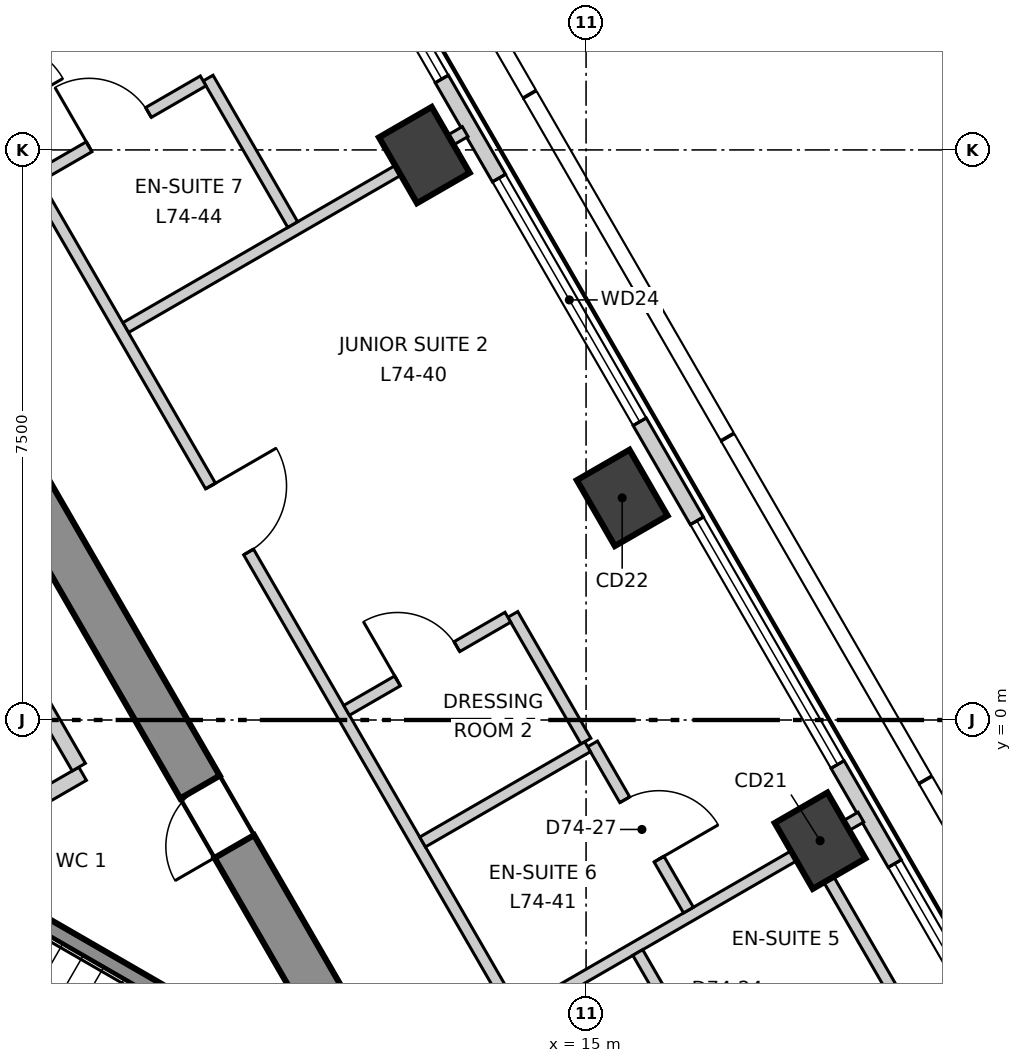
"""IFC4 building model, lengths in metres.
Left out: names, types, materials, properties, quantities, classifications, styles, units other than length and angle.
Written with IfcOpenShell. Run it as: python <this file> out.ifc"""

import sys

from ifc_helpers import new_model, si_unit, direction, frame, frame_2d, origin, origin_2d, place, context, subcontext, project, spatial, polyline, rectangle, outline, extrude, element, fill, save


model = new_model("IFC4")
c1 = context("Model", 3, precision=1e-05, world=origin(), true_north=direction((0.0, 1.0)))
c2 = subcontext(c1, "Body", "Model", "MODEL_VIEW")
j1 = project(units=[si_unit("LENGTHUNIT", "METRE"), si_unit("PLANEANGLEUNIT", "RADIAN")], contexts=[c1])
p1 = place(None, origin())
s1 = spatial("IfcSite", under=j1, at=p1, CompositionType="ELEMENT")
p2 = place(p1, origin())
s2 = spatial("IfcBuilding", under=s1, at=p2, CompositionType="ELEMENT")
p3 = place(p2, frame((0.0, 0.0, 311.5)))
s3 = spatial("IfcBuildingStorey", under=s2, at=p3, CompositionType="ELEMENT", Elevation=311.5)
p4 = place(p3, frame((12.384, -5.15, -0.3), z_axis=(0.0, 0.0, 1.0), x_axis=(-0.500000539815, 0.866025092122, 0.0)))
e1 = element("IfcWall", 1, at=p4, inside=s3, PredefinedType="SHEAR", context=c2, shape_type="SweptSolid", body=[
    extrude(outline(polyline([(-0.173, -0.301), (1.795, -0.301), (3.763, -0.301), (5.731, -0.301), (7.7, -0.301), (9.668, -0.301), (11.636, -0.301), (13.604, -0.3), (15.573, -0.3), (17.541, -0.3), (19.509, -0.3), (21.477, -0.3), (21.131, 0.3), (19.226, 0.3), (17.321, 0.3), (15.415, 0.3), (13.51, 0.3), (11.605, 0.3), (9.699, 0.3), (7.794, 0.3), (5.889, 0.3), (3.984, 0.3), (2.078, 0.3), (0.173, 0.3), (-0.173, -0.301)])), origin(), (0.0, 0.0, 1.0), 3.6),
])
p5 = place(p4, frame((16.378, 0.0, 0.3)))
e2 = element("IfcOpeningElement", 2, at=p5, cuts=e1, PredefinedType="OPENING", context=c2, shape_type="SweptSolid", body=[
    extrude(rectangle(XDim=0.9, YDim=2.1, at=frame_2d((0.45, 1.05))), frame((0.0, 0.31, 0.0), z_axis=(0.0, -1.0, 0.0), x_axis=(1.0, 0.0, 0.0)), (0.0, 0.0, 1.0), 0.621),
])
p6 = place(p4, frame((4.026, 0.0, 0.3)))
e3 = element("IfcOpeningElement", 3, at=p6, cuts=e1, PredefinedType="OPENING", context=c2, shape_type="SweptSolid", body=[
    extrude(rectangle(XDim=0.9, YDim=2.1, at=frame_2d((0.45, 1.05))), frame((0.0, 0.31, 0.0), z_axis=(0.0, -1.0, 0.0), x_axis=(1.0, 0.0, 0.0)), (0.0, 0.0, 1.0), 0.621),
])
for number, where, z_axis, x_axis in (
    (4, (18.079, -1.588, -0.3), (0.0, 0.0, 1.0), (-0.5, 0.866, 0.0)),
    (5, (15.475, 2.922, -0.3), (0.0, 0.0, 1.0), (-0.5, 0.866, 0.0)),
    (6, (12.872, 7.432, -0.3), (0.0, 0.0, 1.0), (-0.5, 0.866, 0.0)),
):
    element("IfcColumn", number, at=place(p3, frame(where, z_axis=z_axis, x_axis=x_axis)), inside=s3, PredefinedType="COLUMN", context=c2, shape_type="SweptSolid", body=[
        extrude(rectangle(XDim=1.0, YDim=0.8, at=origin_2d()), origin(), (0.0, 0.0, 1.0), 3.6),
    ])
p7 = place(p3, frame((24.544, -11.385, 0.0), z_axis=(0.0, 0.0, 1.0), x_axis=(-0.500002044679, 0.866024223285, 0.0)))
e7 = element("IfcWall", 7, at=p7, inside=s3, PredefinedType="ELEMENTEDWALL", context=c2, shape_type="SweptSolid", body=[
    extrude(rectangle(XDim=44.243, YDim=0.2, at=frame_2d((22.122, 0.0))), origin(), (0.0, 0.0, 1.0), 3.3),
])
p8 = place(p7, frame((2.056, 0.0, 0.9)))
e8 = element("IfcOpeningElement", 8, at=p8, cuts=e7, PredefinedType="OPENING", context=c2, shape_type="SweptSolid", body=[
    extrude(rectangle(XDim=3.7, YDim=2.2, at=frame_2d((1.85, 1.1))), frame((0.0, 0.11, 0.0), z_axis=(0.0, -1.0, 0.0), x_axis=(1.0, 0.0, 0.0)), (0.0, 0.0, 1.0), 0.22),
])
p9 = place(p7, frame((7.264, 0.0, 0.9)))
e9 = element("IfcOpeningElement", 9, at=p9, cuts=e7, PredefinedType="OPENING", context=c2, shape_type="SweptSolid", body=[
    extrude(rectangle(XDim=3.7, YDim=2.2, at=frame_2d((1.85, 1.1))), frame((0.0, 0.11, 0.0), z_axis=(0.0, -1.0, 0.0), x_axis=(1.0, 0.0, 0.0)), (0.0, 0.0, 1.0), 0.22),
])
p10 = place(p7, frame((12.471, 0.0, 0.9)))
e10 = element("IfcOpeningElement", 10, at=p10, cuts=e7, PredefinedType="OPENING", context=c2, shape_type="SweptSolid", body=[
    extrude(rectangle(XDim=3.7, YDim=2.2, at=frame_2d((1.85, 1.1))), frame((0.0, 0.11, 0.0), z_axis=(0.0, -1.0, 0.0), x_axis=(1.0, 0.0, 0.0)), (0.0, 0.0, 1.0), 0.22),
])
p11 = place(p7, frame((17.678, 0.0, 0.9)))
e11 = element("IfcOpeningElement", 11, at=p11, cuts=e7, PredefinedType="OPENING", context=c2, shape_type="SweptSolid", body=[
    extrude(rectangle(XDim=3.7, YDim=2.2, at=frame_2d((1.85, 1.1))), frame((0.0, 0.11, 0.0), z_axis=(0.0, -1.0, 0.0), x_axis=(1.0, 0.0, 0.0)), (0.0, 0.0, 1.0), 0.22),
])
p12 = place(p7, frame((22.885, 0.0, 0.9)))
e12 = element("IfcOpeningElement", 12, at=p12, cuts=e7, PredefinedType="OPENING", context=c2, shape_type="SweptSolid", body=[
    extrude(rectangle(XDim=3.7, YDim=2.2, at=frame_2d((1.85, 1.1))), frame((0.0, 0.11, 0.0), z_axis=(0.0, -1.0, 0.0), x_axis=(1.0, 0.0, 0.0)), (0.0, 0.0, 1.0), 0.22),
])
p13 = place(p7, frame((28.093, 0.0, 0.9)))
e13 = element("IfcOpeningElement", 13, at=p13, cuts=e7, PredefinedType="OPENING", context=c2, shape_type="SweptSolid", body=[
    extrude(rectangle(XDim=3.7, YDim=2.2, at=frame_2d((1.85, 1.1))), frame((0.0, 0.11, 0.0), z_axis=(0.0, -1.0, 0.0), x_axis=(1.0, 0.0, 0.0)), (0.0, 0.0, 1.0), 0.22),
])
p14 = place(p7, frame((33.3, 0.0, 0.9)))
e14 = element("IfcOpeningElement", 14, at=p14, cuts=e7, PredefinedType="OPENING", context=c2, shape_type="SweptSolid", body=[
    extrude(rectangle(XDim=3.7, YDim=2.2, at=frame_2d((1.85, 1.1))), frame((0.0, 0.11, 0.0), z_axis=(0.0, -1.0, 0.0), x_axis=(1.0, 0.0, 0.0)), (0.0, 0.0, 1.0), 0.22),
])
p15 = place(p7, frame((38.507, 0.0, 0.9)))
e15 = element("IfcOpeningElement", 15, at=p15, cuts=e7, PredefinedType="OPENING", context=c2, shape_type="SweptSolid", body=[
    extrude(rectangle(XDim=3.7, YDim=2.2, at=frame_2d((1.85, 1.1))), frame((0.0, 0.11, 0.0), z_axis=(0.0, -1.0, 0.0), x_axis=(1.0, 0.0, 0.0)), (0.0, 0.0, 1.0), 0.22),
])
p16 = place(p3, frame((8.942, 5.162, 0.0), z_axis=(0.0, 0.0, 1.0), x_axis=(0.86604134632, 0.499972385701, 0.0)))
e16 = element("IfcWall", 16, at=p16, inside=s3, PredefinedType="PARTITIONING", context=c2, shape_type="SweptSolid", body=[
    extrude(rectangle(XDim=5.158, YDim=0.15, at=frame_2d((2.579, 0.0))), origin(), (0.0, 0.0, 1.0), 2.8),
])
p17 = place(p3, frame((0.075, 20.37, 0.0), z_axis=(0.0, 0.0, 1.0), x_axis=(0.500006672087, -0.866021551619, 0.0)))
e17 = element("IfcWall", 17, at=p17, inside=s3, PredefinedType="PARTITIONING", context=c2, shape_type="SweptSolid", body=[
    extrude(rectangle(XDim=35.27, YDim=0.15, at=frame_2d((17.635, 0.0))), origin(), (0.0, 0.0, 1.0), 3.3),
])
p18 = place(p17, frame((31.206, 0.0, 0.0)))
e18 = element("IfcOpeningElement", 18, at=p18, cuts=e17, PredefinedType="OPENING", context=c2, shape_type="SweptSolid", body=[
    extrude(rectangle(XDim=1.0, YDim=2.1, at=frame_2d((0.5, 1.05))), frame((0.0, 0.085, 0.0), z_axis=(0.0, -1.0, 0.0), x_axis=(1.0, 0.0, 0.0)), (0.0, 0.0, 1.0), 0.17),
])
p19 = place(p17, frame((19.968, 0.0, 0.0)))
e19 = element("IfcOpeningElement", 19, at=p19, cuts=e17, PredefinedType="OPENING", context=c2, shape_type="SweptSolid", body=[
    extrude(rectangle(XDim=1.0, YDim=2.1, at=frame_2d((0.5, 1.05))), frame((0.0, 0.085, 0.0), z_axis=(0.0, -1.0, 0.0), x_axis=(1.0, 0.0, 0.0)), (0.0, 0.0, 1.0), 0.17),
])
p20 = place(p17, frame((13.353, 0.0, 0.0)))
e20 = element("IfcOpeningElement", 20, at=p20, cuts=e17, PredefinedType="OPENING", context=c2, shape_type="SweptSolid", body=[
    extrude(rectangle(XDim=1.0, YDim=2.1, at=frame_2d((0.5, 1.05))), frame((0.0, 0.085, 0.0), z_axis=(0.0, -1.0, 0.0), x_axis=(1.0, 0.0, 0.0)), (0.0, 0.0, 1.0), 0.17),
])
p21 = place(p17, frame((7.746, 0.0, 0.0)))
e21 = element("IfcOpeningElement", 21, at=p21, cuts=e17, PredefinedType="OPENING", context=c2, shape_type="SweptSolid", body=[
    extrude(rectangle(XDim=1.0, YDim=2.1, at=frame_2d((0.5, 1.05))), frame((0.0, 0.085, 0.0), z_axis=(0.0, -1.0, 0.0), x_axis=(1.0, 0.0, 0.0)), (0.0, 0.0, 1.0), 0.17),
])
p22 = place(p17, frame((3.038, 0.0, 0.0)))
e22 = element("IfcOpeningElement", 22, at=p22, cuts=e17, PredefinedType="OPENING", context=c2, shape_type="SweptSolid", body=[
    extrude(rectangle(XDim=1.0, YDim=2.1, at=frame_2d((0.5, 1.05))), frame((0.0, 0.085, 0.0), z_axis=(0.0, -1.0, 0.0), x_axis=(1.0, 0.0, 0.0)), (0.0, 0.0, 1.0), 0.17),
])
p23 = place(p3, frame((14.149, -3.857, 0.0), z_axis=(0.0, 0.0, 1.0), x_axis=(0.86604134632, 0.499972385701, 0.0)))
e23 = element("IfcWall", 23, at=p23, inside=s3, PredefinedType="PARTITIONING", context=c2, shape_type="SweptSolid", body=[
    extrude(rectangle(XDim=5.158, YDim=0.15, at=frame_2d((2.579, 0.0))), origin(), (0.0, 0.0, 1.0), 3.3),
])
p24 = place(p3, frame((10.027, 8.445, 0.0), z_axis=(0.0, 0.0, 1.0), x_axis=(0.500080171303, -0.865979111913, 0.0)))
e24 = element("IfcWall", 24, at=p24, inside=s3, PredefinedType="PARTITIONING", context=c2, shape_type="SweptSolid", body=[
    extrude(rectangle(XDim=2.225, YDim=0.15, at=frame_2d((1.113, 0.0))), origin(), (0.0, 0.0, 1.0), 3.3),
])
p25 = place(p3, frame((15.085, -0.315, 0.0), z_axis=(0.0, 0.0, 1.0), x_axis=(0.499956887143, -0.866050293573, 0.0)))
e25 = element("IfcWall", 25, at=p25, inside=s3, PredefinedType="PARTITIONING", context=c2, shape_type="SweptSolid", body=[
    extrude(rectangle(XDim=2.524, YDim=0.15, at=frame_2d((1.262, 0.0))), origin(), (0.0, 0.0, 1.0), 3.3),
])
p26 = place(p25, frame((0.849, 0.0, 0.0)))
e26 = element("IfcOpeningElement", 26, at=p26, cuts=e25, PredefinedType="OPENING", context=c2, shape_type="SweptSolid", body=[
    extrude(rectangle(XDim=0.9, YDim=2.1, at=frame_2d((0.45, 1.05))), frame((0.0, 0.085, 0.0), z_axis=(0.0, -1.0, 0.0), x_axis=(1.0, 0.0, 0.0)), (0.0, 0.0, 1.0), 0.17),
])
p27 = place(p3, frame((7.792, 7.155, 0.0), z_axis=(0.0, 0.0, 1.0), x_axis=(0.866003851672, 0.500037327496, 0.0)))
e27 = element("IfcWall", 27, at=p27, inside=s3, PredefinedType="PARTITIONING", context=c2, shape_type="SweptSolid", body=[
    extrude(rectangle(XDim=2.506, YDim=0.15, at=frame_2d((1.253, 0.0))), origin(), (0.0, 0.0, 1.0), 3.3),
])
p28 = place(p27, frame((0.774, 0.0, 0.0)))
e28 = element("IfcOpeningElement", 28, at=p28, cuts=e27, PredefinedType="OPENING", context=c2, shape_type="SweptSolid", body=[
    extrude(rectangle(XDim=0.9, YDim=2.1, at=frame_2d((0.45, 1.05))), frame((0.0, 0.085, 0.0), z_axis=(0.0, -1.0, 0.0), x_axis=(1.0, 0.0, 0.0)), (0.0, 0.0, 1.0), 0.17),
])
p29 = place(p3, frame((14.036, 1.389, 0.0), z_axis=(0.0, 0.0, 1.0), x_axis=(0.499890818081, -0.866088430819, 0.0)))
e29 = element("IfcWall", 29, at=p29, inside=s3, PredefinedType="PARTITIONING", context=c2, shape_type="SweptSolid", body=[
    extrude(rectangle(XDim=1.925, YDim=0.15, at=frame_2d((0.962, 0.0))), origin(), (0.0, 0.0, 1.0), 3.3),
])
p30 = place(p3, frame((11.849, 0.127, 0.0), z_axis=(0.0, 0.0, 1.0), x_axis=(0.866014668023, 0.500018594424, 0.0)))
e30 = element("IfcWall", 30, at=p30, inside=s3, PredefinedType="PARTITIONING", context=c2, shape_type="SweptSolid", body=[
    extrude(rectangle(XDim=2.45, YDim=0.15, at=frame_2d((1.225, 0.0))), origin(), (0.0, 0.0, 1.0), 3.3),
])
p31 = place(p30, frame((0.775, 0.0, 0.0)))
e31 = element("IfcOpeningElement", 31, at=p31, cuts=e30, PredefinedType="OPENING", context=c2, shape_type="SweptSolid", body=[
    extrude(rectangle(XDim=0.9, YDim=2.1, at=frame_2d((0.45, 1.05))), frame((0.0, 0.085, 0.0), z_axis=(0.0, -1.0, 0.0), x_axis=(1.0, 0.0, 0.0)), (0.0, 0.0, 1.0), 0.17),
])
p32 = place(p3, frame((12.849, -1.605, 0.0), z_axis=(0.0, 0.0, 1.0), x_axis=(0.866101252082, 0.499868603878, 0.0)))
e32 = element("IfcWall", 32, at=p32, inside=s3, PredefinedType="PARTITIONING", context=c2, shape_type="SweptSolid", body=[
    extrude(rectangle(XDim=2.507, YDim=0.15, at=frame_2d((1.253, 0.0))), origin(), (0.0, 0.0, 1.0), 3.3),
])
p33 = place(p3, frame((15.68, -3.059, 0.0), z_axis=(0.0, 0.0, 1.0), x_axis=(0.500096029888, -0.865969953804, 0.0)))
e33 = element("IfcWall", 33, at=p33, inside=s3, PredefinedType="PARTITIONING", context=c2, shape_type="SweptSolid", body=[
    extrude(rectangle(XDim=4.525, YDim=0.15, at=frame_2d((2.263, 0.0))), origin(), (0.0, 0.0, 1.0), 3.3),
])
p34 = place(p33, frame((0.776, 0.0, 0.0)))
e34 = element("IfcOpeningElement", 34, at=p34, cuts=e33, PredefinedType="OPENING", context=c2, shape_type="SweptSolid", body=[
    extrude(rectangle(XDim=0.9, YDim=2.1, at=frame_2d((0.45, 1.05))), frame((0.0, 0.085, 0.0), z_axis=(0.0, -1.0, 0.0), x_axis=(1.0, 0.0, 0.0)), (0.0, 0.0, 1.0), 0.17),
])
p35 = place(p3, frame((17.981, -1.731, 0.0), z_axis=(0.0, 0.0, 1.0), x_axis=(0.499975448907, -0.8660395779, 0.0)))
e35 = element("IfcWall", 35, at=p35, inside=s3, PredefinedType="PARTITIONING", context=c2, shape_type="SweptSolid", body=[
    extrude(rectangle(XDim=2.45, YDim=0.15, at=frame_2d((1.225, 0.0))), origin(), (0.0, 0.0, 1.0), 2.6),
])
p36 = place(p3, frame((6.642, -1.708, 0.0), z_axis=(0.0, 0.0, 1.0), x_axis=(0.866043441391, 0.499968756647, 0.0)))
e36 = element("IfcWall", 36, at=p36, inside=s3, PredefinedType="SOLIDWALL", context=c2, shape_type="SweptSolid", body=[
    extrude(rectangle(XDim=2.002, YDim=0.2, at=frame_2d((1.001, 0.0))), origin(), (0.0, 0.0, 1.0), 3.3),
])
p37 = place(p3, frame((6.826, 1.978, 0.0), z_axis=(0.0, 0.0, 1.0), x_axis=(0.499990139034, -0.866031096941, 0.0)))
e37 = element("IfcWall", 37, at=p37, inside=s3, PredefinedType="SOLIDWALL", context=c2, shape_type="SweptSolid", body=[
    extrude(rectangle(XDim=3.0, YDim=0.2, at=frame_2d((1.5, 0.0))), origin(), (0.0, 0.0, 1.0), 3.3),
])
p38 = place(p3, frame((6.529, -1.922, 0.0), z_axis=(0.0, 0.0, 1.0), x_axis=(0.866068467981, -0.499925403204, 0.0)))
e38 = element("IfcWall", 38, at=p38, inside=s3, PredefinedType="SOLIDWALL", context=c2, shape_type="SweptSolid", body=[
    extrude(rectangle(XDim=6.665, YDim=0.2, at=frame_2d((3.332, 0.0))), origin(), (0.0, 0.0, 1.0), 3.3),
])
p39 = place(p9, origin())
e39 = element("IfcWindow", 39, at=p39, inside=s3, PartitioningType="SINGLE_PANEL", PredefinedType="WINDOW", context=c2, shape_type="SweptSolid", body=[
    extrude(rectangle(XDim=3.7, YDim=2.2, at=frame_2d((1.85, 1.1))), frame((0.0, 0.03, 0.0), z_axis=(0.0, -1.0, 0.0), x_axis=(1.0, 0.0, 0.0)), (0.0, 0.0, 1.0), 0.06),
])
fill(e9, e39)
p40 = place(p10, origin())
e40 = element("IfcWindow", 40, at=p40, inside=s3, PartitioningType="SINGLE_PANEL", PredefinedType="WINDOW", context=c2, shape_type="SweptSolid", body=[
    extrude(rectangle(XDim=3.7, YDim=2.2, at=frame_2d((1.85, 1.1))), frame((0.0, 0.03, 0.0), z_axis=(0.0, -1.0, 0.0), x_axis=(1.0, 0.0, 0.0)), (0.0, 0.0, 1.0), 0.06),
])
fill(e10, e40)
p41 = place(p11, origin())
e41 = element("IfcWindow", 41, at=p41, inside=s3, PartitioningType="SINGLE_PANEL", PredefinedType="WINDOW", context=c2, shape_type="SweptSolid", body=[
    extrude(rectangle(XDim=3.7, YDim=2.2, at=frame_2d((1.85, 1.1))), frame((0.0, 0.03, 0.0), z_axis=(0.0, -1.0, 0.0), x_axis=(1.0, 0.0, 0.0)), (0.0, 0.0, 1.0), 0.06),
])
fill(e11, e41)
p42 = place(p12, origin())
e42 = element("IfcWindow", 42, at=p42, inside=s3, PartitioningType="SINGLE_PANEL", PredefinedType="WINDOW", context=c2, shape_type="SweptSolid", body=[
    extrude(rectangle(XDim=3.7, YDim=2.2, at=frame_2d((1.85, 1.1))), frame((0.0, 0.03, 0.0), z_axis=(0.0, -1.0, 0.0), x_axis=(1.0, 0.0, 0.0)), (0.0, 0.0, 1.0), 0.06),
])
fill(e12, e42)
p43 = place(p19, origin())
e43 = element("IfcDoor", 43, at=p43, inside=s3, OperationType="SINGLE_SWING_RIGHT", PredefinedType="DOOR", context=c2, shape_type="SweptSolid", body=[
    extrude(rectangle(XDim=1.0, YDim=2.1, at=frame_2d((0.5, 1.05))), frame((0.0, 0.025, 0.0), z_axis=(0.0, -1.0, 0.0), x_axis=(1.0, 0.0, 0.0)), (0.0, 0.0, 1.0), 0.05),
])
fill(e19, e43)
p44 = place(p26, origin())
e44 = element("IfcDoor", 44, at=p44, inside=s3, OperationType="SINGLE_SWING_LEFT", PredefinedType="DOOR", context=c2, shape_type="SweptSolid", body=[
    extrude(rectangle(XDim=0.9, YDim=2.1, at=frame_2d((0.45, 1.05))), frame((0.0, 0.025, 0.0), z_axis=(0.0, -1.0, 0.0), x_axis=(1.0, 0.0, 0.0)), (0.0, 0.0, 1.0), 0.05),
])
fill(e26, e44)
p45 = place(p31, origin())
e45 = element("IfcDoor", 45, at=p45, inside=s3, OperationType="SINGLE_SWING_RIGHT", PredefinedType="DOOR", context=c2, shape_type="SweptSolid", body=[
    extrude(rectangle(XDim=0.9, YDim=2.1, at=frame_2d((0.45, 1.05))), frame((0.0, 0.025, 0.0), z_axis=(0.0, -1.0, 0.0), x_axis=(1.0, 0.0, 0.0)), (0.0, 0.0, 1.0), 0.05),
])
fill(e31, e45)
p46 = place(p28, origin())
e46 = element("IfcDoor", 46, at=p46, inside=s3, OperationType="SINGLE_SWING_RIGHT", PredefinedType="DOOR", context=c2, shape_type="SweptSolid", body=[
    extrude(rectangle(XDim=0.9, YDim=2.1, at=frame_2d((0.45, 1.05))), frame((0.0, 0.025, 0.0), z_axis=(0.0, -1.0, 0.0), x_axis=(1.0, 0.0, 0.0)), (0.0, 0.0, 1.0), 0.05),
])
fill(e28, e46)
p47 = place(p6, origin())
e47 = element("IfcDoor", 47, at=p47, inside=s3, OperationType="SINGLE_SWING_RIGHT", PredefinedType="DOOR", context=c2, shape_type="SweptSolid", body=[
    extrude(rectangle(XDim=0.9, YDim=2.1, at=frame_2d((0.45, 1.05))), frame((0.0, 0.025, 0.0), z_axis=(0.0, -1.0, 0.0), x_axis=(1.0, 0.0, 0.0)), (0.0, 0.0, 1.0), 0.05),
])
fill(e3, e47)
save(model, sys.argv[1])
